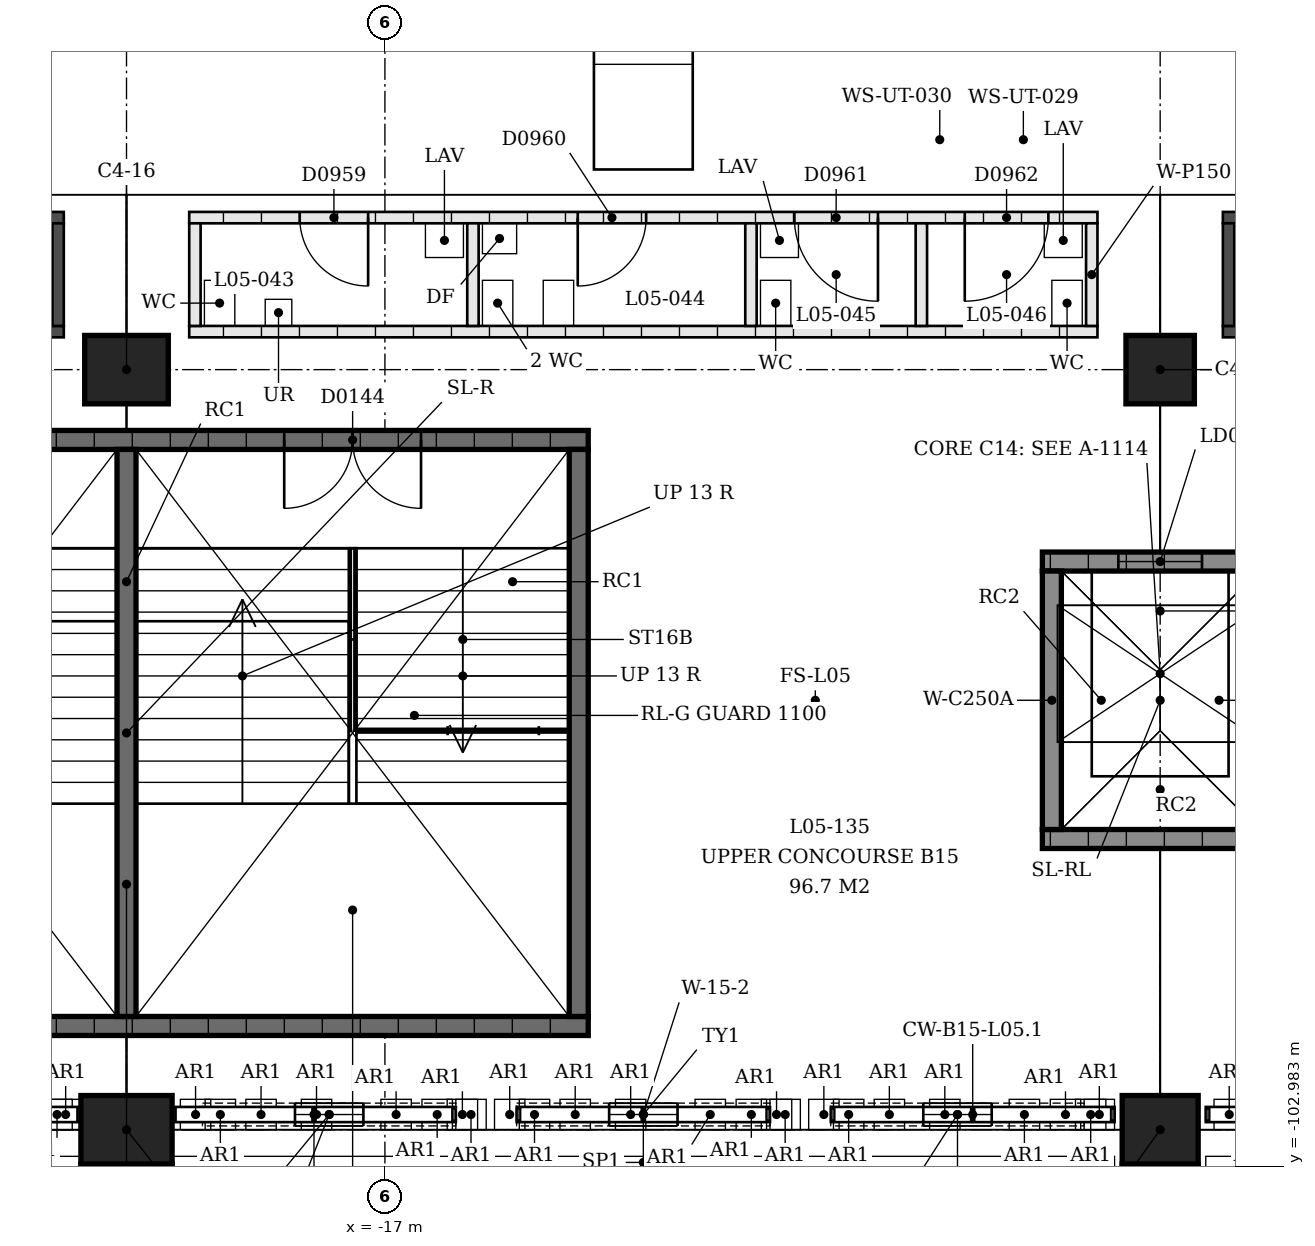
"""IFC4 building model, lengths in metres.
Left out: names, types, materials, properties, quantities, classifications, styles, units other than length and angle.
Written with IfcOpenShell. Run it as: python <this file> out.ifc"""

import sys

from ifc_helpers import new_model, si_unit, direction, frame, frame_2d, origin, origin_2d, place, context, subcontext, project, spatial, polyline, rectangle, outline, extrude, element, fill, save


model = new_model("IFC4")
c1 = context("Model", 3, precision=1e-05, world=origin(), true_north=direction((0.0, 1.0)))
c2 = subcontext(c1, "Body", "Model", "MODEL_VIEW")
j1 = project(units=[si_unit("LENGTHUNIT", "METRE"), si_unit("PLANEANGLEUNIT", "RADIAN")], contexts=[c1])
p1 = place(None, origin())
s1 = spatial("IfcSite", under=j1, at=p1, CompositionType="ELEMENT")
p2 = place(p1, origin())
s2 = spatial("IfcBuilding", under=s1, at=p2, CompositionType="ELEMENT")
p3 = place(p2, frame((0.0, 0.0, 22.5)))
s3 = spatial("IfcBuildingStorey", under=s2, at=p3, CompositionType="ELEMENT", Elevation=22.5)
p4 = place(p3, frame((-6.8, -92.5, 0.0), z_axis=(0.0, 0.0, 1.0), x_axis=(1.0, 0.0, 0.0)))
e1 = element("IfcColumn", 1, at=p4, inside=s3, PredefinedType="COLUMN", context=c2, shape_type="SweptSolid", body=[
    extrude(rectangle(XDim=0.9, YDim=0.9, at=origin_2d()), origin(), (0.0, 0.0, 1.0), 6.5),
])
p5 = place(p3, frame((-6.8, -102.5, 0.0), z_axis=(0.0, 0.0, 1.0), x_axis=(1.0, 0.0, 0.0)))
e2 = element("IfcColumn", 2, at=p5, inside=s3, PredefinedType="COLUMN", context=c2, shape_type="SweptSolid", body=[
    extrude(rectangle(XDim=1.0, YDim=0.9, at=origin_2d()), origin(), (0.0, 0.0, 1.0), 6.5),
])
p6 = place(p3, frame((-20.4, -92.5, 0.0), z_axis=(0.0, 0.0, 1.0), x_axis=(1.0, 0.0, 0.0)))
e3 = element("IfcColumn", 3, at=p6, inside=s3, PredefinedType="COLUMN", context=c2, shape_type="SweptSolid", body=[
    extrude(rectangle(XDim=1.1, YDim=0.9, at=origin_2d()), origin(), (0.0, 0.0, 1.0), 6.5),
])
p7 = place(p3, frame((-20.4, -102.5, 0.0), z_axis=(0.0, 0.0, 1.0), x_axis=(1.0, 0.0, 0.0)))
e4 = element("IfcColumn", 4, at=p7, inside=s3, PredefinedType="COLUMN", context=c2, shape_type="SweptSolid", body=[
    extrude(rectangle(XDim=1.2, YDim=0.9, at=origin_2d()), origin(), (0.0, 0.0, 1.0), 6.5),
])
p8 = place(p3, frame((-7.8, -102.3, 4.1), z_axis=(0.0, 0.0, 1.0), x_axis=(-1.0, 0.0, 0.0)))
e5 = element("IfcWall", 5, at=p8, inside=s3, PredefinedType="SOLIDWALL", context=c2, shape_type="SweptSolid", body=[
    extrude(outline(polyline([(0.0, 0.0), (3.333, 0.0), (3.333, 0.05), (3.225, 1.288), (2.905, 2.541), (2.38, 3.722), (1.667, 4.8), (0.953, 3.722), (0.428, 2.541), (0.108, 1.288), (0.0, 0.05), (0.0, 0.0)])), frame((0.0, 0.15, 0.0), z_axis=(0.0, -1.0, 0.0), x_axis=(1.0, 0.0, 0.0)), (0.0, 0.0, 1.0), 0.3),
])
p9 = place(p8, frame((1.217, 0.0, 0.4)))
e6 = element("IfcOpeningElement", 6, at=p9, cuts=e5, PredefinedType="OPENING", context=c2, shape_type="SweptSolid", body=[
    extrude(rectangle(XDim=0.9, YDim=3.6, at=frame_2d((0.45, 1.8))), frame((0.0, 0.16, 0.0), z_axis=(0.0, -1.0, 0.0), x_axis=(1.0, 0.0, 0.0)), (0.0, 0.0, 1.0), 0.32),
])
p10 = place(p3, frame((-11.933, -102.3, 4.1), z_axis=(0.0, 0.0, 1.0), x_axis=(-1.0, 0.0, 0.0)))
e7 = element("IfcWall", 7, at=p10, inside=s3, PredefinedType="SOLIDWALL", context=c2, shape_type="SweptSolid", body=[
    extrude(outline(polyline([(0.0, 0.0), (3.333, 0.0), (3.333, 0.05), (3.225, 1.288), (2.905, 2.541), (2.38, 3.722), (1.667, 4.8), (0.953, 3.722), (0.428, 2.541), (0.108, 1.288), (0.0, 0.05), (0.0, 0.0)])), frame((0.0, 0.15, 0.0), z_axis=(0.0, -1.0, 0.0), x_axis=(1.0, 0.0, 0.0)), (0.0, 0.0, 1.0), 0.3),
])
p11 = place(p10, frame((1.217, 0.0, 0.4)))
e8 = element("IfcOpeningElement", 8, at=p11, cuts=e7, PredefinedType="OPENING", context=c2, shape_type="SweptSolid", body=[
    extrude(rectangle(XDim=0.9, YDim=3.6, at=frame_2d((0.45, 1.8))), frame((0.0, 0.16, 0.0), z_axis=(0.0, -1.0, 0.0), x_axis=(1.0, 0.0, 0.0)), (0.0, 0.0, 1.0), 0.32),
])
p12 = place(p3, frame((-16.067, -102.3, 4.1), z_axis=(0.0, 0.0, 1.0), x_axis=(-1.0, 0.0, 0.0)))
e9 = element("IfcWall", 9, at=p12, inside=s3, PredefinedType="SOLIDWALL", context=c2, shape_type="SweptSolid", body=[
    extrude(outline(polyline([(0.0, 0.0), (3.333, 0.0), (3.333, 0.05), (3.225, 1.288), (2.905, 2.541), (2.38, 3.722), (1.667, 4.8), (0.953, 3.722), (0.428, 2.541), (0.108, 1.288), (0.0, 0.05), (0.0, 0.0)])), frame((0.0, 0.15, 0.0), z_axis=(0.0, -1.0, 0.0), x_axis=(1.0, 0.0, 0.0)), (0.0, 0.0, 1.0), 0.3),
])
p13 = place(p12, frame((1.217, 0.0, 0.4)))
e10 = element("IfcOpeningElement", 10, at=p13, cuts=e9, PredefinedType="OPENING", context=c2, shape_type="SweptSolid", body=[
    extrude(rectangle(XDim=0.9, YDim=3.6, at=frame_2d((0.45, 1.8))), frame((0.0, 0.16, 0.0), z_axis=(0.0, -1.0, 0.0), x_axis=(1.0, 0.0, 0.0)), (0.0, 0.0, 1.0), 0.32),
])
p14 = place(p3, frame((-26.475, -93.425, 0.0), z_axis=(0.0, 0.0, 1.0), x_axis=(1.0, 0.0, 0.0)))
e11 = element("IfcWall", 11, at=p14, inside=s3, PredefinedType="SHEAR", context=c2, shape_type="SweptSolid", body=[
    extrude(rectangle(XDim=12.15, YDim=0.25, at=frame_2d((6.075, 0.0))), origin(), (0.0, 0.0, 1.0), 2.1),
])
p15 = place(p14, frame((2.2, 0.0, 0.0)))
e12 = element("IfcOpeningElement", 12, at=p15, cuts=e11, PredefinedType="OPENING", context=c2, shape_type="SweptSolid", body=[
    extrude(rectangle(XDim=1.8, YDim=2.1, at=frame_2d((0.9, 1.05))), frame((0.0, 0.125, 0.0), z_axis=(0.0, -1.0, 0.0), x_axis=(1.0, 0.0, 0.0)), (0.0, 0.0, 1.0), 0.25),
])
p16 = place(p14, frame((8.15, 0.0, 0.0)))
e13 = element("IfcOpeningElement", 13, at=p16, cuts=e11, PredefinedType="OPENING", context=c2, shape_type="SweptSolid", body=[
    extrude(rectangle(XDim=1.8, YDim=2.1, at=frame_2d((0.9, 1.05))), frame((0.0, 0.125, 0.0), z_axis=(0.0, -1.0, 0.0), x_axis=(1.0, 0.0, 0.0)), (0.0, 0.0, 1.0), 0.25),
])
p17 = place(p3, frame((-26.475, -101.135, 0.0), z_axis=(0.0, 0.0, 1.0), x_axis=(1.0, 0.0, 0.0)))
e14 = element("IfcWall", 14, at=p17, inside=s3, PredefinedType="SHEAR", context=c2, shape_type="SweptSolid", body=[
    extrude(rectangle(XDim=12.15, YDim=0.25, at=frame_2d((6.075, 0.0))), origin(), (0.0, 0.0, 1.0), 2.1),
])
for number, where, z_axis, x_axis in (
    (15, (-14.45, -93.55, 0.0), (0.0, 0.0, 1.0), (0.0, -1.0, 0.0)),
    (16, (-20.4, -93.55, 0.0), (0.0, 0.0, 1.0), (0.0, -1.0, 0.0)),
):
    element("IfcWall", number, at=place(p3, frame(where, z_axis=z_axis, x_axis=x_axis)), inside=s3, PredefinedType="SHEAR", context=c2, shape_type="SweptSolid", body=[
        extrude(rectangle(XDim=7.46, YDim=0.25, at=frame_2d((3.73, 0.0))), origin(), (0.0, 0.0, 1.0), 2.1),
    ])
p18 = place(p3, frame((-8.35, -95.025, 0.0), z_axis=(0.0, 0.0, 1.0), x_axis=(1.0, 0.0, 0.0)))
e17 = element("IfcWall", 17, at=p18, inside=s3, PredefinedType="SHEAR", context=c2, shape_type="SweptSolid", body=[
    extrude(rectangle(XDim=3.1, YDim=0.25, at=frame_2d((1.55, 0.0))), origin(), (0.0, 0.0, 1.0), 3.4),
])
p19 = place(p18, frame((1.0, 0.0, 0.0)))
e18 = element("IfcOpeningElement", 18, at=p19, cuts=e17, PredefinedType="OPENING", context=c2, shape_type="SweptSolid", body=[
    extrude(rectangle(XDim=1.1, YDim=2.1, at=frame_2d((0.55, 1.05))), frame((0.0, 0.125, 0.0), z_axis=(0.0, -1.0, 0.0), x_axis=(1.0, 0.0, 0.0)), (0.0, 0.0, 1.0), 0.25),
])
p20 = place(p3, frame((-8.35, -98.675, 0.0), z_axis=(0.0, 0.0, 1.0), x_axis=(1.0, 0.0, 0.0)))
e19 = element("IfcWall", 19, at=p20, inside=s3, PredefinedType="SHEAR", context=c2, shape_type="SweptSolid", body=[
    extrude(rectangle(XDim=3.1, YDim=0.25, at=frame_2d((1.55, 0.0))), origin(), (0.0, 0.0, 1.0), 3.4),
])
p21 = place(p3, frame((-8.225, -95.15, 0.0), z_axis=(0.0, 0.0, 1.0), x_axis=(0.0, -1.0, 0.0)))
e20 = element("IfcWall", 20, at=p21, inside=s3, PredefinedType="SHEAR", context=c2, shape_type="SweptSolid", body=[
    extrude(rectangle(XDim=3.4, YDim=0.25, at=frame_2d((1.7, 0.0))), origin(), (0.0, 0.0, 1.0), 3.4),
])
p22 = place(p3, frame((5.975, -90.5, 0.0), z_axis=(0.0, 0.0, 1.0), x_axis=(-1.0, 0.0, 0.0)))
e21 = element("IfcWall", 21, at=p22, inside=s3, PredefinedType="SOLIDWALL", context=c2, shape_type="SweptSolid", body=[
    extrude(rectangle(XDim=11.95, YDim=0.15, at=frame_2d((5.975, 0.0))), origin(), (0.0, 0.0, 1.0), 3.0),
])
p23 = place(p22, frame((2.525, 0.0, 0.0)))
e22 = element("IfcOpeningElement", 22, at=p23, cuts=e21, PredefinedType="OPENING", context=c2, shape_type="SweptSolid", body=[
    extrude(rectangle(XDim=1.0, YDim=2.1, at=frame_2d((0.5, 1.05))), frame((0.0, 0.075, 0.0), z_axis=(0.0, -1.0, 0.0), x_axis=(1.0, 0.0, 0.0)), (0.0, 0.0, 1.0), 0.15),
])
p24 = place(p22, frame((8.425, 0.0, 0.0)))
e23 = element("IfcOpeningElement", 23, at=p24, cuts=e21, PredefinedType="OPENING", context=c2, shape_type="SweptSolid", body=[
    extrude(rectangle(XDim=1.0, YDim=2.1, at=frame_2d((0.5, 1.05))), frame((0.0, 0.075, 0.0), z_axis=(0.0, -1.0, 0.0), x_axis=(1.0, 0.0, 0.0)), (0.0, 0.0, 1.0), 0.15),
])
p25 = place(p3, frame((5.975, -92.0, 0.0), z_axis=(0.0, 0.0, 1.0), x_axis=(-1.0, 0.0, 0.0)))
e24 = element("IfcWall", 24, at=p25, inside=s3, PredefinedType="SOLIDWALL", context=c2, shape_type="SweptSolid", body=[
    extrude(rectangle(XDim=11.95, YDim=0.15, at=frame_2d((5.975, 0.0))), origin(), (0.0, 0.0, 1.0), 3.0),
])
p26 = place(p3, frame((-5.9, -90.575, 0.0), z_axis=(0.0, 0.0, 1.0), x_axis=(0.0, -1.0, 0.0)))
e25 = element("IfcWall", 25, at=p26, inside=s3, PredefinedType="SOLIDWALL", context=c2, shape_type="SweptSolid", body=[
    extrude(rectangle(XDim=1.35, YDim=0.15, at=frame_2d((0.675, 0.0))), origin(), (0.0, 0.0, 1.0), 3.0),
])
p27 = place(p3, frame((-19.575, -90.5, 0.0), z_axis=(0.0, 0.0, 1.0), x_axis=(1.0, 0.0, 0.0)))
e26 = element("IfcWall", 26, at=p27, inside=s3, PredefinedType="PARTITIONING", context=c2, shape_type="SweptSolid", body=[
    extrude(rectangle(XDim=11.95, YDim=0.15, at=frame_2d((5.975, 0.0))), origin(), (0.0, 0.0, 1.0), 3.0),
])
p28 = place(p27, frame((1.454, 0.0, 0.0)))
e27 = element("IfcOpeningElement", 27, at=p28, cuts=e26, PredefinedType="OPENING", context=c2, shape_type="SweptSolid", body=[
    extrude(rectangle(XDim=0.9, YDim=2.1, at=frame_2d((0.45, 1.05))), frame((0.0, 0.075, 0.0), z_axis=(0.0, -1.0, 0.0), x_axis=(1.0, 0.0, 0.0)), (0.0, 0.0, 1.0), 0.15),
])
p29 = place(p27, frame((5.112, 0.0, 0.0)))
e28 = element("IfcOpeningElement", 28, at=p29, cuts=e26, PredefinedType="OPENING", context=c2, shape_type="SweptSolid", body=[
    extrude(rectangle(XDim=0.9, YDim=2.1, at=frame_2d((0.45, 1.05))), frame((0.0, 0.075, 0.0), z_axis=(0.0, -1.0, 0.0), x_axis=(1.0, 0.0, 0.0)), (0.0, 0.0, 1.0), 0.15),
])
p30 = place(p27, frame((7.962, 0.0, 0.0)))
e29 = element("IfcOpeningElement", 29, at=p30, cuts=e26, PredefinedType="OPENING", context=c2, shape_type="SweptSolid", body=[
    extrude(rectangle(XDim=1.1, YDim=2.1, at=frame_2d((0.55, 1.05))), frame((0.0, 0.075, 0.0), z_axis=(0.0, -1.0, 0.0), x_axis=(1.0, 0.0, 0.0)), (0.0, 0.0, 1.0), 0.15),
])
p31 = place(p27, frame((10.204, 0.0, 0.0)))
e30 = element("IfcOpeningElement", 30, at=p31, cuts=e26, PredefinedType="OPENING", context=c2, shape_type="SweptSolid", body=[
    extrude(rectangle(XDim=1.1, YDim=2.1, at=frame_2d((0.55, 1.05))), frame((0.0, 0.075, 0.0), z_axis=(0.0, -1.0, 0.0), x_axis=(1.0, 0.0, 0.0)), (0.0, 0.0, 1.0), 0.15),
])
p32 = place(p3, frame((-19.575, -92.0, 0.0), z_axis=(0.0, 0.0, 1.0), x_axis=(1.0, 0.0, 0.0)))
e31 = element("IfcWall", 31, at=p32, inside=s3, PredefinedType="PARTITIONING", context=c2, shape_type="SweptSolid", body=[
    extrude(rectangle(XDim=11.95, YDim=0.15, at=frame_2d((5.975, 0.0))), origin(), (0.0, 0.0, 1.0), 3.0),
])
for number, where, z_axis, x_axis in (
    (32, (-19.5, -90.575, 0.0), (0.0, 0.0, 1.0), (0.0, -1.0, 0.0)),
    (33, (-15.842, -90.575, 0.0), (0.0, 0.0, 1.0), (0.0, -1.0, 0.0)),
    (34, (-12.184, -90.575, 0.0), (0.0, 0.0, 1.0), (0.0, -1.0, 0.0)),
    (35, (-9.942, -90.575, 0.0), (0.0, 0.0, 1.0), (0.0, -1.0, 0.0)),
    (36, (-7.7, -90.575, 0.0), (0.0, 0.0, 1.0), (0.0, -1.0, 0.0)),
):
    element("IfcWall", number, at=place(p3, frame(where, z_axis=z_axis, x_axis=x_axis)), inside=s3, PredefinedType="PARTITIONING", context=c2, shape_type="SweptSolid", body=[
        extrude(rectangle(XDim=1.35, YDim=0.15, at=frame_2d((0.675, 0.0))), origin(), (0.0, 0.0, 1.0), 3.0),
    ])
p33 = place(p3, frame((-21.225, -90.5, 0.0), z_axis=(0.0, 0.0, 1.0), x_axis=(-1.0, 0.0, 0.0)))
e37 = element("IfcWall", 37, at=p33, inside=s3, PredefinedType="SOLIDWALL", context=c2, shape_type="SweptSolid", body=[
    extrude(rectangle(XDim=11.95, YDim=0.15, at=frame_2d((5.975, 0.0))), origin(), (0.0, 0.0, 1.0), 3.0),
])
p34 = place(p33, frame((2.525, 0.0, 0.0)))
e38 = element("IfcOpeningElement", 38, at=p34, cuts=e37, PredefinedType="OPENING", context=c2, shape_type="SweptSolid", body=[
    extrude(rectangle(XDim=1.0, YDim=2.1, at=frame_2d((0.5, 1.05))), frame((0.0, 0.075, 0.0), z_axis=(0.0, -1.0, 0.0), x_axis=(1.0, 0.0, 0.0)), (0.0, 0.0, 1.0), 0.15),
])
p35 = place(p33, frame((8.425, 0.0, 0.0)))
e39 = element("IfcOpeningElement", 39, at=p35, cuts=e37, PredefinedType="OPENING", context=c2, shape_type="SweptSolid", body=[
    extrude(rectangle(XDim=1.0, YDim=2.1, at=frame_2d((0.5, 1.05))), frame((0.0, 0.075, 0.0), z_axis=(0.0, -1.0, 0.0), x_axis=(1.0, 0.0, 0.0)), (0.0, 0.0, 1.0), 0.15),
])
p36 = place(p3, frame((-21.225, -92.0, 0.0), z_axis=(0.0, 0.0, 1.0), x_axis=(-1.0, 0.0, 0.0)))
e40 = element("IfcWall", 40, at=p36, inside=s3, PredefinedType="SOLIDWALL", context=c2, shape_type="SweptSolid", body=[
    extrude(rectangle(XDim=11.95, YDim=0.15, at=frame_2d((5.975, 0.0))), origin(), (0.0, 0.0, 1.0), 3.0),
])
p37 = place(p3, frame((-21.3, -90.575, 0.0), z_axis=(0.0, 0.0, 1.0), x_axis=(0.0, -1.0, 0.0)))
e41 = element("IfcWall", 41, at=p37, inside=s3, PredefinedType="SOLIDWALL", context=c2, shape_type="SweptSolid", body=[
    extrude(rectangle(XDim=1.35, YDim=0.15, at=frame_2d((0.675, 0.0))), origin(), (0.0, 0.0, 1.0), 3.0),
])
p38 = place(p9, origin())
e42 = element("IfcWindow", 42, at=p38, inside=s3, PartitioningType="SINGLE_PANEL", PredefinedType="WINDOW", context=c2, shape_type="SweptSolid", body=[
    extrude(rectangle(XDim=0.9, YDim=3.6, at=frame_2d((0.45, 1.8))), frame((0.0, 0.03, 0.0), z_axis=(0.0, -1.0, 0.0), x_axis=(1.0, 0.0, 0.0)), (0.0, 0.0, 1.0), 0.06),
])
fill(e6, e42)
p39 = place(p11, origin())
e43 = element("IfcWindow", 43, at=p39, inside=s3, PartitioningType="SINGLE_PANEL", PredefinedType="WINDOW", context=c2, shape_type="SweptSolid", body=[
    extrude(rectangle(XDim=0.9, YDim=3.6, at=frame_2d((0.45, 1.8))), frame((0.0, 0.03, 0.0), z_axis=(0.0, -1.0, 0.0), x_axis=(1.0, 0.0, 0.0)), (0.0, 0.0, 1.0), 0.06),
])
fill(e8, e43)
p40 = place(p13, origin())
e44 = element("IfcWindow", 44, at=p40, inside=s3, PartitioningType="SINGLE_PANEL", PredefinedType="WINDOW", context=c2, shape_type="SweptSolid", body=[
    extrude(rectangle(XDim=0.9, YDim=3.6, at=frame_2d((0.45, 1.8))), frame((0.0, 0.03, 0.0), z_axis=(0.0, -1.0, 0.0), x_axis=(1.0, 0.0, 0.0)), (0.0, 0.0, 1.0), 0.06),
])
fill(e10, e44)
p41 = place(p16, origin())
e45 = element("IfcDoor", 45, at=p41, inside=s3, OperationType="DOUBLE_DOOR_SINGLE_SWING", PredefinedType="DOOR", context=c2, shape_type="SweptSolid", body=[
    extrude(rectangle(XDim=1.8, YDim=2.1, at=frame_2d((0.9, 1.05))), frame((0.0, 0.025, 0.0), z_axis=(0.0, -1.0, 0.0), x_axis=(1.0, 0.0, 0.0)), (0.0, 0.0, 1.0), 0.05),
])
fill(e13, e45)
p42 = place(p19, origin())
e46 = element("IfcDoor", 46, at=p42, inside=s3, OperationType="SLIDING_TO_LEFT", PredefinedType="DOOR", context=c2, shape_type="SweptSolid", body=[
    extrude(rectangle(XDim=1.1, YDim=2.1, at=frame_2d((0.55, 1.05))), frame((0.0, 0.025, 0.0), z_axis=(0.0, -1.0, 0.0), x_axis=(1.0, 0.0, 0.0)), (0.0, 0.0, 1.0), 0.05),
])
fill(e18, e46)
p43 = place(p28, origin())
e47 = element("IfcDoor", 47, at=p43, inside=s3, OperationType="SINGLE_SWING_RIGHT", PredefinedType="DOOR", context=c2, shape_type="SweptSolid", body=[
    extrude(rectangle(XDim=0.9, YDim=2.1, at=frame_2d((0.45, 1.05))), frame((0.0, 0.025, 0.0), z_axis=(0.0, -1.0, 0.0), x_axis=(1.0, 0.0, 0.0)), (0.0, 0.0, 1.0), 0.05),
])
fill(e27, e47)
p44 = place(p29, origin())
e48 = element("IfcDoor", 48, at=p44, inside=s3, OperationType="SINGLE_SWING_LEFT", PredefinedType="DOOR", context=c2, shape_type="SweptSolid", body=[
    extrude(rectangle(XDim=0.9, YDim=2.1, at=frame_2d((0.45, 1.05))), frame((0.0, 0.025, 0.0), z_axis=(0.0, -1.0, 0.0), x_axis=(1.0, 0.0, 0.0)), (0.0, 0.0, 1.0), 0.05),
])
fill(e28, e48)
p45 = place(p30, origin())
e49 = element("IfcDoor", 49, at=p45, inside=s3, OperationType="SINGLE_SWING_RIGHT", PredefinedType="DOOR", context=c2, shape_type="SweptSolid", body=[
    extrude(rectangle(XDim=1.1, YDim=2.1, at=frame_2d((0.55, 1.05))), frame((0.0, 0.025, 0.0), z_axis=(0.0, -1.0, 0.0), x_axis=(1.0, 0.0, 0.0)), (0.0, 0.0, 1.0), 0.05),
])
fill(e29, e49)
p46 = place(p31, origin())
e50 = element("IfcDoor", 50, at=p46, inside=s3, OperationType="SINGLE_SWING_LEFT", PredefinedType="DOOR", context=c2, shape_type="SweptSolid", body=[
    extrude(rectangle(XDim=1.1, YDim=2.1, at=frame_2d((0.55, 1.05))), frame((0.0, 0.025, 0.0), z_axis=(0.0, -1.0, 0.0), x_axis=(1.0, 0.0, 0.0)), (0.0, 0.0, 1.0), 0.05),
])
fill(e30, e50)
save(model, sys.argv[1])
